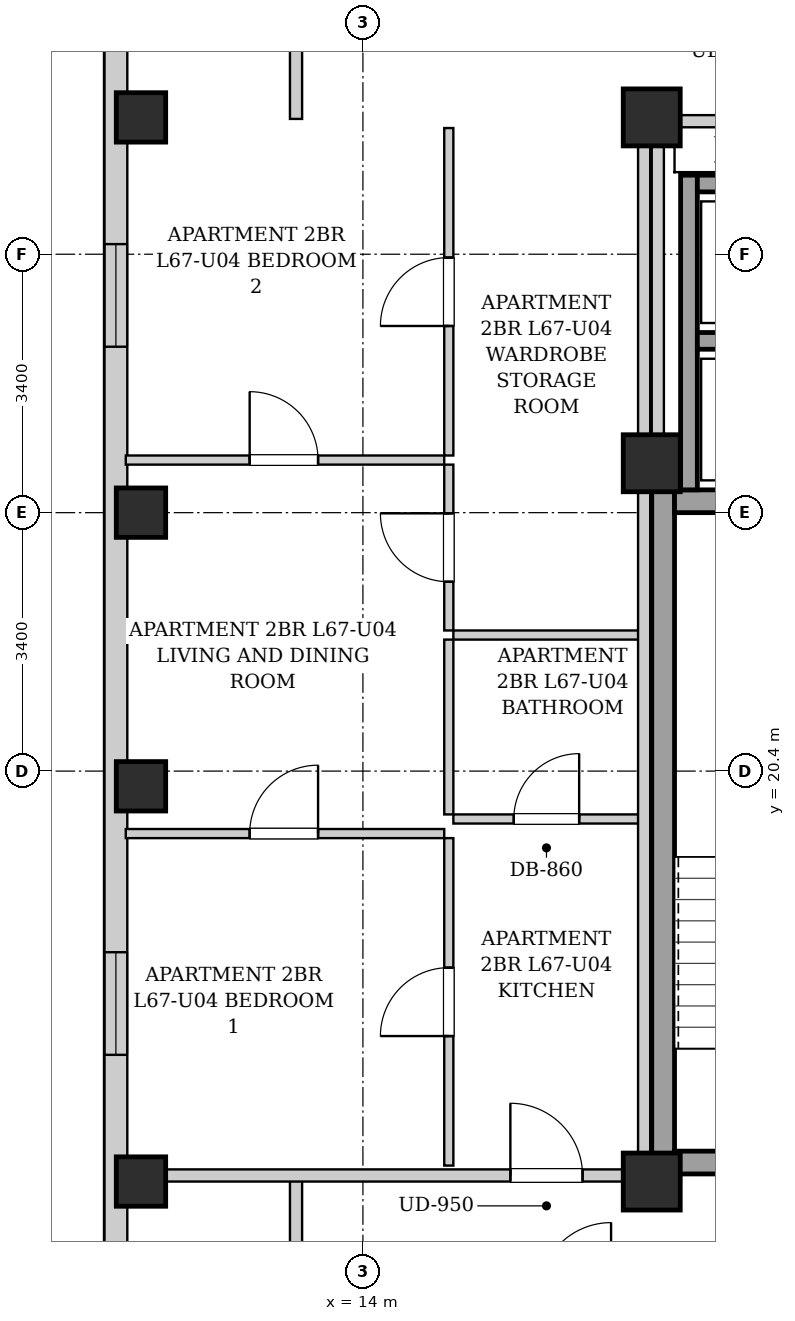
"""IFC4 building model, lengths in metres.
Left out: names, types, materials, properties, quantities, classifications, styles, units other than length and angle.
Written with IfcOpenShell. Run it as: python <this file> out.ifc"""

import sys

from ifc_helpers import new_model, si_unit, direction, frame, frame_2d, origin, origin_2d, place, context, subcontext, project, spatial, rectangle, extrude, element, fill, save


model = new_model("IFC4")
c1 = context("Model", 3, precision=1e-05, world=origin(), true_north=direction((0.0, 1.0)))
c2 = subcontext(c1, "Body", "Model", "MODEL_VIEW")
j1 = project(units=[si_unit("LENGTHUNIT", "METRE"), si_unit("PLANEANGLEUNIT", "RADIAN")], contexts=[c1])
p1 = place(None, origin())
s1 = spatial("IfcSite", under=j1, at=p1, CompositionType="ELEMENT")
p2 = place(p1, origin())
s2 = spatial("IfcBuilding", under=s1, at=p2, CompositionType="ELEMENT")
p3 = place(p2, frame((0.0, 0.0, 230.9)))
s3 = spatial("IfcBuildingStorey", under=s2, at=p3, CompositionType="ELEMENT", Elevation=230.9)
for number, where, z_axis, x_axis in (
    (1, (11.08, 15.0, 0.0), (0.0, 0.0, 1.0), (1.0, 0.0, 0.0)),
    (2, (11.08, 20.2, 0.0), (0.0, 0.0, 1.0), (1.0, 0.0, 0.0)),
    (3, (11.08, 23.8, 0.0), (0.0, 0.0, 1.0), (1.0, 0.0, 0.0)),
    (4, (11.08, 29.0, 0.0), (0.0, 0.0, 1.0), (1.0, 0.0, 0.0)),
):
    element("IfcColumn", number, at=place(p3, frame(where, z_axis=z_axis, x_axis=x_axis)), inside=s3, PredefinedType="COLUMN", context=c2, shape_type="SweptSolid", body=[
        extrude(rectangle(XDim=0.65, YDim=0.65, at=origin_2d()), origin(), (0.0, 0.0, 1.0), 3.4),
    ])
for number, where, z_axis, x_axis in (
    (5, (17.8, 15.0, 0.0), (0.0, 0.0, 1.0), (1.0, 0.0, 0.0)),
    (6, (17.8, 29.0, 0.0), (0.0, 0.0, 1.0), (1.0, 0.0, 0.0)),
    (7, (17.8, 24.45, 0.0), (0.0, 0.0, 1.0), (1.0, 0.0, 0.0)),
):
    element("IfcColumn", number, at=place(p3, frame(where, z_axis=z_axis, x_axis=x_axis)), inside=s3, PredefinedType="COLUMN", context=c2, shape_type="SweptSolid", body=[
        extrude(rectangle(XDim=0.75, YDim=0.75, at=origin_2d()), origin(), (0.0, 0.0, 1.0), 3.4),
    ])
p4 = place(p3, frame((10.75, 6.3, 0.0), z_axis=(0.0, 0.0, 1.0), x_axis=(0.0, 1.0, 0.0)))
e8 = element("IfcWall", 8, at=p4, inside=s3, PredefinedType="SOLIDWALL", context=c2, shape_type="SweptSolid", body=[
    extrude(rectangle(XDim=31.4, YDim=0.3, at=frame_2d((15.7, 0.0))), origin(), (0.0, 0.0, 1.0), 3.14),
])
p5 = place(p4, frame((1.653, 0.0, 0.55)))
e9 = element("IfcOpeningElement", 9, at=p5, cuts=e8, PredefinedType="OPENING", context=c2, shape_type="SweptSolid", body=[
    extrude(rectangle(XDim=1.35, YDim=1.2, at=frame_2d((0.675, 0.6))), frame((0.0, 0.16, 0.0), z_axis=(0.0, -1.0, 0.0), x_axis=(1.0, 0.0, 0.0)), (0.0, 0.0, 1.0), 0.32),
])
p6 = place(p4, frame((10.367, 0.0, 0.55)))
e10 = element("IfcOpeningElement", 10, at=p6, cuts=e8, PredefinedType="OPENING", context=c2, shape_type="SweptSolid", body=[
    extrude(rectangle(XDim=1.35, YDim=1.2, at=frame_2d((0.675, 0.6))), frame((0.0, 0.16, 0.0), z_axis=(0.0, -1.0, 0.0), x_axis=(1.0, 0.0, 0.0)), (0.0, 0.0, 1.0), 0.32),
])
p7 = place(p4, frame((19.683, 0.0, 0.55)))
e11 = element("IfcOpeningElement", 11, at=p7, cuts=e8, PredefinedType="OPENING", context=c2, shape_type="SweptSolid", body=[
    extrude(rectangle(XDim=1.35, YDim=1.2, at=frame_2d((0.675, 0.6))), frame((0.0, 0.16, 0.0), z_axis=(0.0, -1.0, 0.0), x_axis=(1.0, 0.0, 0.0)), (0.0, 0.0, 1.0), 0.32),
])
p8 = place(p3, frame((17.95, 15.1, 0.0), z_axis=(0.0, 0.0, 1.0), x_axis=(0.0, 1.0, 0.0)))
e12 = element("IfcWall", 12, at=p8, inside=s3, PredefinedType="SHEAR", context=c2, shape_type="SweptSolid", body=[
    extrude(rectangle(XDim=9.0, YDim=0.3, at=frame_2d((4.5, 0.0))), origin(), (0.0, 0.0, 1.0), 3.14),
])
p9 = place(p3, frame((18.1, 23.95, 0.0), z_axis=(0.0, 0.0, 1.0), x_axis=(1.0, 0.0, 0.0)))
e13 = element("IfcWall", 13, at=p9, inside=s3, PredefinedType="SHEAR", context=c2, shape_type="SweptSolid", body=[
    extrude(rectangle(XDim=2.85, YDim=0.3, at=frame_2d((1.425, 0.0))), origin(), (0.0, 0.0, 1.0), 3.14),
])
p10 = place(p3, frame((18.1, 15.25, 0.0), z_axis=(0.0, 0.0, 1.0), x_axis=(1.0, 0.0, 0.0)))
e14 = element("IfcWall", 14, at=p10, inside=s3, PredefinedType="SHEAR", context=c2, shape_type="SweptSolid", body=[
    extrude(rectangle(XDim=2.85, YDim=0.3, at=frame_2d((1.425, 0.0))), origin(), (0.0, 0.0, 1.0), 3.14),
])
p11 = place(p10, frame((0.86, 0.0, 0.0)))
e15 = element("IfcOpeningElement", 15, at=p11, cuts=e14, PredefinedType="OPENING", context=c2, shape_type="SweptSolid", body=[
    extrude(rectangle(XDim=1.1, YDim=2.05, at=frame_2d((0.55, 1.025))), frame((0.0, 0.16, 0.0), z_axis=(0.0, -1.0, 0.0), x_axis=(1.0, 0.0, 0.0)), (0.0, 0.0, 1.0), 0.32),
])
p12 = place(p3, frame((18.29, 24.1, 0.0), z_axis=(0.0, 0.0, 1.0), x_axis=(0.0, 1.0, 0.0)))
e16 = element("IfcWall", 16, at=p12, inside=s3, PredefinedType="SHEAR", context=c2, shape_type="SweptSolid", body=[
    extrude(rectangle(XDim=4.14, YDim=0.22, at=frame_2d((2.07, 0.0))), origin(), (0.0, 0.0, 1.0), 3.14),
])
for number, where, z_axis, x_axis in (
    (17, (18.4, 26.06, 0.0), (0.0, 0.0, 1.0), (1.0, 0.0, 0.0)),
    (18, (18.4, 28.13, 0.0), (0.0, 0.0, 1.0), (1.0, 0.0, 0.0)),
):
    element("IfcWall", number, at=place(p3, frame(where, z_axis=z_axis, x_axis=x_axis)), inside=s3, PredefinedType="SHEAR", context=c2, shape_type="SweptSolid", body=[
        extrude(rectangle(XDim=1.9, YDim=0.22, at=frame_2d((0.95, 0.0))), origin(), (0.0, 0.0, 1.0), 3.14),
    ])
p13 = place(p3, frame((17.88, 24.12, 0.0), z_axis=(0.0, 0.0, 1.0), x_axis=(0.0, 1.0, 0.0)))
e19 = element("IfcWall", 19, at=p13, inside=s3, PredefinedType="PARTITIONING", context=c2, shape_type="SweptSolid", body=[
    extrude(rectangle(XDim=4.76, YDim=0.16, at=frame_2d((2.38, 0.0))), origin(), (0.0, 0.0, 1.0), 3.14),
])
p14 = place(p3, frame((17.96, 28.95, 0.0), z_axis=(0.0, 0.0, 1.0), x_axis=(1.0, 0.0, 0.0)))
e20 = element("IfcWall", 20, at=p14, inside=s3, PredefinedType="PARTITIONING", context=c2, shape_type="SweptSolid", body=[
    extrude(rectangle(XDim=4.29, YDim=0.16, at=frame_2d((2.145, 0.0))), origin(), (0.0, 0.0, 1.0), 2.668),
])
p15 = place(p14, frame((1.715, 0.0, 0.0)))
e21 = element("IfcOpeningElement", 21, at=p15, cuts=e20, PredefinedType="OPENING", context=c2, shape_type="SweptSolid", body=[
    extrude(rectangle(XDim=0.86, YDim=2.05, at=frame_2d((0.43, 1.025))), frame((0.0, 0.09, 0.0), z_axis=(0.0, -1.0, 0.0), x_axis=(1.0, 0.0, 0.0)), (0.0, 0.0, 1.0), 0.18),
])
for number, where, z_axis, x_axis in (
    (22, (13.12, 13.51, 0.0), (0.0, 0.0, 1.0), (0.0, 1.0, 0.0)),
    (23, (13.12, 28.98, 0.0), (0.0, 0.0, 1.0), (0.0, 1.0, 0.0)),
):
    element("IfcWall", number, at=place(p3, frame(where, z_axis=z_axis, x_axis=x_axis)), inside=s3, PredefinedType="PARTITIONING", context=c2, shape_type="SweptSolid", body=[
        extrude(rectangle(XDim=1.58, YDim=0.16, at=frame_2d((0.79, 0.0))), origin(), (0.0, 0.0, 1.0), 3.14),
    ])
p16 = place(p3, frame((10.88, 15.08, 0.0), z_axis=(0.0, 0.0, 1.0), x_axis=(1.0, 0.0, 0.0)))
e24 = element("IfcWall", 24, at=p16, inside=s3, PredefinedType="PARTITIONING", context=c2, shape_type="SweptSolid", body=[
    extrude(rectangle(XDim=6.88, YDim=0.16, at=frame_2d((3.44, 0.0))), origin(), (0.0, 0.0, 1.0), 2.668),
])
p17 = place(p16, frame((5.06, 0.0, 0.0)))
e25 = element("IfcOpeningElement", 25, at=p17, cuts=e24, PredefinedType="OPENING", context=c2, shape_type="SweptSolid", body=[
    extrude(rectangle(XDim=0.95, YDim=2.1, at=frame_2d((0.475, 1.05))), frame((0.0, 0.09, 0.0), z_axis=(0.0, -1.0, 0.0), x_axis=(1.0, 0.0, 0.0)), (0.0, 0.0, 1.0), 0.18),
])
p18 = place(p3, frame((15.19, 22.19, 0.0), z_axis=(0.0, 0.0, 1.0), x_axis=(1.0, 0.0, 0.0)))
e26 = element("IfcWall", 26, at=p18, inside=s3, PredefinedType="PARTITIONING", context=c2, shape_type="SweptSolid", body=[
    extrude(rectangle(XDim=2.45, YDim=0.12, at=frame_2d((1.225, 0.0))), origin(), (0.0, 0.0, 1.0), 3.14),
])
p19 = place(p3, frame((15.13, 22.25, 0.0), z_axis=(0.0, 0.0, 1.0), x_axis=(0.0, 1.0, 0.0)))
e27 = element("IfcWall", 27, at=p19, inside=s3, PredefinedType="PARTITIONING", context=c2, shape_type="SweptSolid", body=[
    extrude(rectangle(XDim=2.182, YDim=0.12, at=frame_2d((1.091, 0.0))), origin(), (0.0, 0.0, 1.0), 3.14),
])
p20 = place(p19, frame((0.641, 0.0, 0.0)))
e28 = element("IfcOpeningElement", 28, at=p20, cuts=e27, PredefinedType="OPENING", context=c2, shape_type="SweptSolid", body=[
    extrude(rectangle(XDim=0.9, YDim=2.05, at=frame_2d((0.45, 1.025))), frame((0.0, 0.07, 0.0), z_axis=(0.0, -1.0, 0.0), x_axis=(1.0, 0.0, 0.0)), (0.0, 0.0, 1.0), 0.14),
])
p21 = place(p3, frame((15.13, 24.552, 0.0), z_axis=(0.0, 0.0, 1.0), x_axis=(0.0, 1.0, 0.0)))
e29 = element("IfcWall", 29, at=p21, inside=s3, PredefinedType="PARTITIONING", context=c2, shape_type="SweptSolid", body=[
    extrude(rectangle(XDim=4.308, YDim=0.12, at=frame_2d((2.154, 0.0))), origin(), (0.0, 0.0, 1.0), 3.14),
])
p22 = place(p21, frame((1.704, 0.0, 0.0)))
e30 = element("IfcOpeningElement", 30, at=p22, cuts=e29, PredefinedType="OPENING", context=c2, shape_type="SweptSolid", body=[
    extrude(rectangle(XDim=0.9, YDim=2.05, at=frame_2d((0.45, 1.025))), frame((0.0, 0.07, 0.0), z_axis=(0.0, -1.0, 0.0), x_axis=(1.0, 0.0, 0.0)), (0.0, 0.0, 1.0), 0.14),
])
p23 = place(p3, frame((15.19, 19.77, 0.0), z_axis=(0.0, 0.0, 1.0), x_axis=(1.0, 0.0, 0.0)))
e31 = element("IfcWall", 31, at=p23, inside=s3, PredefinedType="PARTITIONING", context=c2, shape_type="SweptSolid", body=[
    extrude(rectangle(XDim=2.45, YDim=0.12, at=frame_2d((1.225, 0.0))), origin(), (0.0, 0.0, 1.0), 3.14),
])
p24 = place(p23, frame((0.795, 0.0, 0.0)))
e32 = element("IfcOpeningElement", 32, at=p24, cuts=e31, PredefinedType="OPENING", context=c2, shape_type="SweptSolid", body=[
    extrude(rectangle(XDim=0.86, YDim=2.05, at=frame_2d((0.43, 1.025))), frame((0.0, 0.07, 0.0), z_axis=(0.0, -1.0, 0.0), x_axis=(1.0, 0.0, 0.0)), (0.0, 0.0, 1.0), 0.14),
])
p25 = place(p3, frame((15.13, 19.83, 0.0), z_axis=(0.0, 0.0, 1.0), x_axis=(0.0, 1.0, 0.0)))
e33 = element("IfcWall", 33, at=p25, inside=s3, PredefinedType="PARTITIONING", context=c2, shape_type="SweptSolid", body=[
    extrude(rectangle(XDim=2.3, YDim=0.12, at=frame_2d((1.15, 0.0))), origin(), (0.0, 0.0, 1.0), 3.14),
])
p26 = place(p3, frame((15.13, 15.21, 0.0), z_axis=(0.0, 0.0, 1.0), x_axis=(0.0, 1.0, 0.0)))
e34 = element("IfcWall", 34, at=p26, inside=s3, PredefinedType="PARTITIONING", context=c2, shape_type="SweptSolid", body=[
    extrude(rectangle(XDim=4.308, YDim=0.12, at=frame_2d((2.154, 0.0))), origin(), (0.0, 0.0, 1.0), 3.14),
])
p27 = place(p26, frame((1.704, 0.0, 0.0)))
e35 = element("IfcOpeningElement", 35, at=p27, cuts=e34, PredefinedType="OPENING", context=c2, shape_type="SweptSolid", body=[
    extrude(rectangle(XDim=0.9, YDim=2.05, at=frame_2d((0.45, 1.025))), frame((0.0, 0.07, 0.0), z_axis=(0.0, -1.0, 0.0), x_axis=(1.0, 0.0, 0.0)), (0.0, 0.0, 1.0), 0.14),
])
p28 = place(p3, frame((10.88, 19.578, 0.0), z_axis=(0.0, 0.0, 1.0), x_axis=(1.0, 0.0, 0.0)))
e36 = element("IfcWall", 36, at=p28, inside=s3, PredefinedType="PARTITIONING", context=c2, shape_type="SweptSolid", body=[
    extrude(rectangle(XDim=4.19, YDim=0.12, at=frame_2d((2.095, 0.0))), origin(), (0.0, 0.0, 1.0), 3.14),
])
p29 = place(p28, frame((1.63, 0.0, 0.0)))
e37 = element("IfcOpeningElement", 37, at=p29, cuts=e36, PredefinedType="OPENING", context=c2, shape_type="SweptSolid", body=[
    extrude(rectangle(XDim=0.9, YDim=2.05, at=frame_2d((0.45, 1.025))), frame((0.0, 0.07, 0.0), z_axis=(0.0, -1.0, 0.0), x_axis=(1.0, 0.0, 0.0)), (0.0, 0.0, 1.0), 0.14),
])
p30 = place(p3, frame((10.88, 24.492, 0.0), z_axis=(0.0, 0.0, 1.0), x_axis=(1.0, 0.0, 0.0)))
e38 = element("IfcWall", 38, at=p30, inside=s3, PredefinedType="PARTITIONING", context=c2, shape_type="SweptSolid", body=[
    extrude(rectangle(XDim=4.19, YDim=0.12, at=frame_2d((2.095, 0.0))), origin(), (0.0, 0.0, 1.0), 2.878),
])
p31 = place(p30, frame((1.63, 0.0, 0.0)))
e39 = element("IfcOpeningElement", 39, at=p31, cuts=e38, PredefinedType="OPENING", context=c2, shape_type="SweptSolid", body=[
    extrude(rectangle(XDim=0.9, YDim=2.05, at=frame_2d((0.45, 1.025))), frame((0.0, 0.07, 0.0), z_axis=(0.0, -1.0, 0.0), x_axis=(1.0, 0.0, 0.0)), (0.0, 0.0, 1.0), 0.14),
])
p32 = place(p3, frame((17.7, 15.02, 0.0), z_axis=(0.0, 0.0, 1.0), x_axis=(0.0, 1.0, 0.0)))
e40 = element("IfcWall", 40, at=p32, inside=s3, PredefinedType="PARTITIONING", context=c2, shape_type="SweptSolid", body=[
    extrude(rectangle(XDim=13.98, YDim=0.16, at=frame_2d((6.99, 0.0))), origin(), (0.0, 0.0, 1.0), 3.14),
])
p33 = place(p17, origin())
e41 = element("IfcDoor", 41, at=p33, inside=s3, OperationType="SINGLE_SWING_LEFT", PredefinedType="DOOR", context=c2, shape_type="SweptSolid", body=[
    extrude(rectangle(XDim=0.95, YDim=2.1, at=frame_2d((0.475, 1.05))), frame((0.0, 0.025, 0.0), z_axis=(0.0, -1.0, 0.0), x_axis=(1.0, 0.0, 0.0)), (0.0, 0.0, 1.0), 0.05),
])
fill(e25, e41)
p34 = place(p20, origin())
e42 = element("IfcDoor", 42, at=p34, inside=s3, OperationType="SINGLE_SWING_RIGHT", PredefinedType="DOOR", context=c2, shape_type="SweptSolid", body=[
    extrude(rectangle(XDim=0.9, YDim=2.05, at=frame_2d((0.45, 1.025))), frame((0.0, 0.025, 0.0), z_axis=(0.0, -1.0, 0.0), x_axis=(1.0, 0.0, 0.0)), (0.0, 0.0, 1.0), 0.05),
])
fill(e28, e42)
p35 = place(p22, origin())
e43 = element("IfcDoor", 43, at=p35, inside=s3, OperationType="SINGLE_SWING_LEFT", PredefinedType="DOOR", context=c2, shape_type="SweptSolid", body=[
    extrude(rectangle(XDim=0.9, YDim=2.05, at=frame_2d((0.45, 1.025))), frame((0.0, 0.025, 0.0), z_axis=(0.0, -1.0, 0.0), x_axis=(1.0, 0.0, 0.0)), (0.0, 0.0, 1.0), 0.05),
])
fill(e30, e43)
p36 = place(p24, origin())
e44 = element("IfcDoor", 44, at=p36, inside=s3, OperationType="SINGLE_SWING_RIGHT", PredefinedType="DOOR", context=c2, shape_type="SweptSolid", body=[
    extrude(rectangle(XDim=0.86, YDim=2.05, at=frame_2d((0.43, 1.025))), frame((0.0, 0.025, 0.0), z_axis=(0.0, -1.0, 0.0), x_axis=(1.0, 0.0, 0.0)), (0.0, 0.0, 1.0), 0.05),
])
fill(e32, e44)
p37 = place(p27, origin())
e45 = element("IfcDoor", 45, at=p37, inside=s3, OperationType="SINGLE_SWING_LEFT", PredefinedType="DOOR", context=c2, shape_type="SweptSolid", body=[
    extrude(rectangle(XDim=0.9, YDim=2.05, at=frame_2d((0.45, 1.025))), frame((0.0, 0.025, 0.0), z_axis=(0.0, -1.0, 0.0), x_axis=(1.0, 0.0, 0.0)), (0.0, 0.0, 1.0), 0.05),
])
fill(e35, e45)
p38 = place(p29, origin())
e46 = element("IfcDoor", 46, at=p38, inside=s3, OperationType="SINGLE_SWING_RIGHT", PredefinedType="DOOR", context=c2, shape_type="SweptSolid", body=[
    extrude(rectangle(XDim=0.9, YDim=2.05, at=frame_2d((0.45, 1.025))), frame((0.0, 0.025, 0.0), z_axis=(0.0, -1.0, 0.0), x_axis=(1.0, 0.0, 0.0)), (0.0, 0.0, 1.0), 0.05),
])
fill(e37, e46)
p39 = place(p31, origin())
e47 = element("IfcDoor", 47, at=p39, inside=s3, OperationType="SINGLE_SWING_LEFT", PredefinedType="DOOR", context=c2, shape_type="SweptSolid", body=[
    extrude(rectangle(XDim=0.9, YDim=2.05, at=frame_2d((0.45, 1.025))), frame((0.0, 0.025, 0.0), z_axis=(0.0, -1.0, 0.0), x_axis=(1.0, 0.0, 0.0)), (0.0, 0.0, 1.0), 0.05),
])
fill(e39, e47)
p40 = place(p6, origin())
e48 = element("IfcWindow", 48, at=p40, inside=s3, PartitioningType="SINGLE_PANEL", PredefinedType="WINDOW", context=c2, shape_type="SweptSolid", body=[
    extrude(rectangle(XDim=1.35, YDim=1.2, at=frame_2d((0.675, 0.6))), frame((0.0, 0.03, 0.0), z_axis=(0.0, -1.0, 0.0), x_axis=(1.0, 0.0, 0.0)), (0.0, 0.0, 1.0), 0.06),
])
fill(e10, e48)
p41 = place(p7, origin())
e49 = element("IfcWindow", 49, at=p41, inside=s3, PartitioningType="SINGLE_PANEL", PredefinedType="WINDOW", context=c2, shape_type="SweptSolid", body=[
    extrude(rectangle(XDim=1.35, YDim=1.2, at=frame_2d((0.675, 0.6))), frame((0.0, 0.03, 0.0), z_axis=(0.0, -1.0, 0.0), x_axis=(1.0, 0.0, 0.0)), (0.0, 0.0, 1.0), 0.06),
])
fill(e11, e49)
save(model, sys.argv[1])
